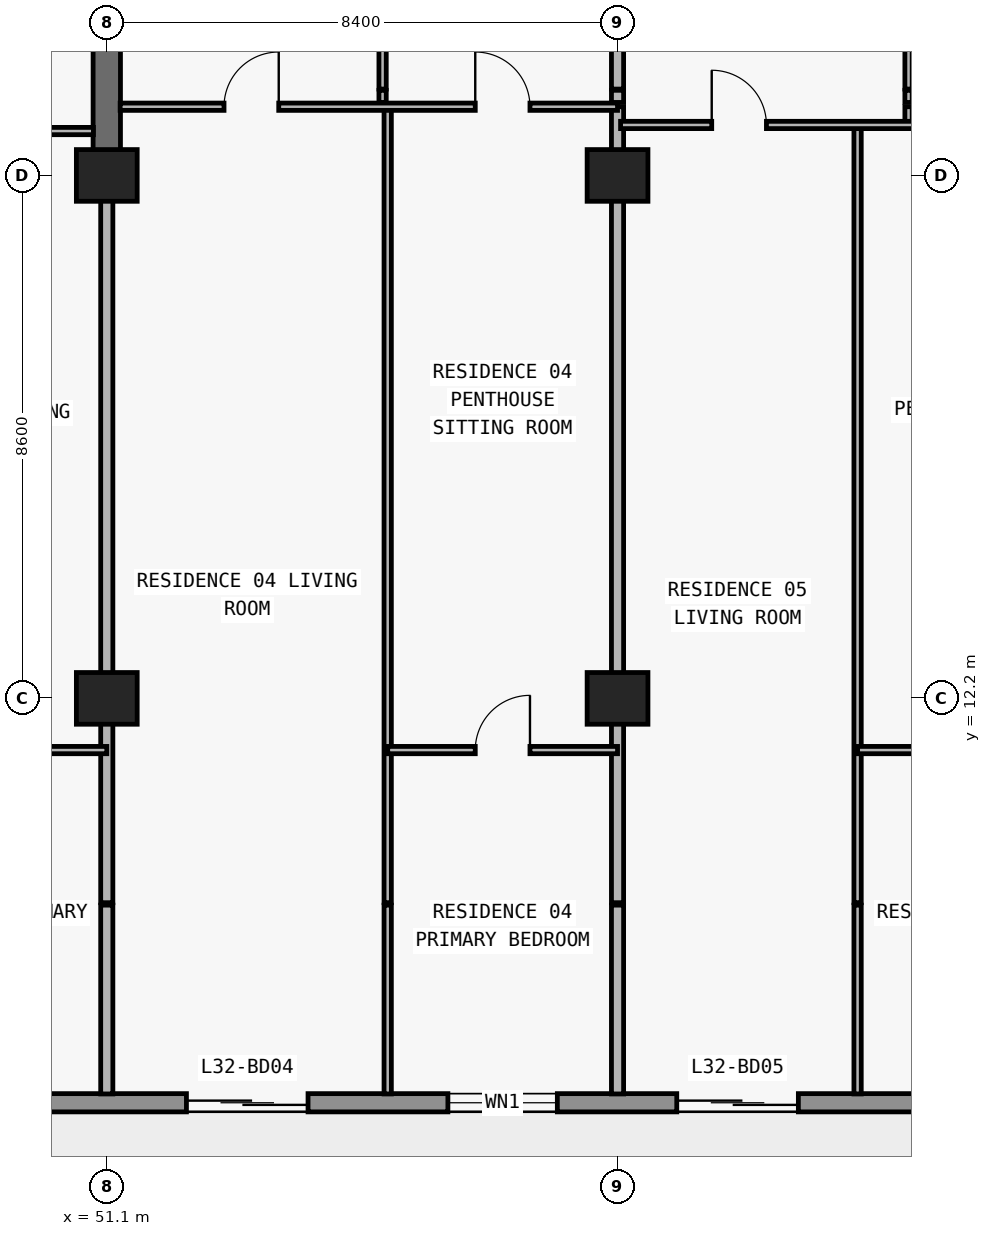
"""IFC4 building model, lengths in metres.
Left out: names, types, materials, properties, quantities, classifications, styles, units other than length and angle.
Written with IfcOpenShell. Run it as: python <this file> out.ifc"""

import sys

from ifc_helpers import new_model, si_unit, direction, frame, frame_2d, origin, origin_2d, place, context, subcontext, project, spatial, rectangle, extrude, element, fill, save


model = new_model("IFC4")
c1 = context("Model", 3, precision=1e-05, world=origin(), true_north=direction((0.0, 1.0)))
c2 = subcontext(c1, "Body", "Model", "MODEL_VIEW")
j1 = project(units=[si_unit("LENGTHUNIT", "METRE"), si_unit("PLANEANGLEUNIT", "RADIAN")], contexts=[c1])
p1 = place(None, origin())
s1 = spatial("IfcSite", under=j1, at=p1, CompositionType="ELEMENT")
p2 = place(p1, origin())
s2 = spatial("IfcBuilding", under=s1, at=p2, CompositionType="ELEMENT")
p3 = place(p2, frame((0.0, 0.0, 119.1)))
s3 = spatial("IfcBuildingStorey", under=s2, at=p3, CompositionType="ELEMENT", Elevation=119.1)
for number, where, z_axis, x_axis in (
    (1, (51.1, 12.2, 0.0), (0.0, 0.0, 1.0), (1.0, 0.0, 0.0)),
    (2, (59.5, 12.2, 0.0), (0.0, 0.0, 1.0), (1.0, 0.0, 0.0)),
    (3, (51.1, 20.8, 0.0), (0.0, 0.0, 1.0), (1.0, 0.0, 0.0)),
    (4, (59.5, 20.8, 0.0), (0.0, 0.0, 1.0), (1.0, 0.0, 0.0)),
):
    element("IfcColumn", number, at=place(p3, frame(where, z_axis=z_axis, x_axis=x_axis)), inside=s3, PredefinedType="COLUMN", context=c2, shape_type="SweptSolid", body=[
        extrude(rectangle(XDim=1.0, YDim=0.85, at=origin_2d()), origin(), (0.0, 0.0, 1.0), 3.05),
    ])
p4 = place(p3, frame((51.1, 20.8, 0.0), z_axis=(0.0, 0.0, 1.0), x_axis=(0.0, 1.0, 0.0)))
e5 = element("IfcWall", 5, at=p4, inside=s3, PredefinedType="SHEAR", context=c2, shape_type="SweptSolid", body=[
    extrude(rectangle(XDim=8.6, YDim=0.45, at=frame_2d((4.3, 0.0))), origin(), (0.0, 0.0, 1.0), 3.05),
])
p5 = place(p3, frame((70.1, 5.55, 0.0), z_axis=(0.0, 0.0, 1.0), x_axis=(-1.0, 0.0, 0.0)))
e6 = element("IfcWall", 6, at=p5, inside=s3, PredefinedType="STANDARD", context=c2, shape_type="SweptSolid", body=[
    extrude(rectangle(XDim=62.4, YDim=0.3, at=frame_2d((31.2, 0.0))), origin(), (0.0, 0.0, 1.0), 3.05),
])
p6 = place(p5, frame((57.29, 0.0, 0.0)))
e7 = element("IfcOpeningElement", 7, at=p6, cuts=e6, PredefinedType="OPENING", context=c2, shape_type="SweptSolid", body=[
    extrude(rectangle(XDim=2.0, YDim=2.3, at=frame_2d((1.0, 1.15))), frame((0.0, 0.16, 0.0), z_axis=(0.0, -1.0, 0.0), x_axis=(1.0, 0.0, 0.0)), (0.0, 0.0, 1.0), 0.32),
])
p7 = place(p5, frame((52.61, 0.0, 0.65)))
e8 = element("IfcOpeningElement", 8, at=p7, cuts=e6, PredefinedType="OPENING", context=c2, shape_type="SweptSolid", body=[
    extrude(rectangle(XDim=2.6, YDim=1.85, at=frame_2d((1.3, 0.925))), frame((0.0, 0.16, 0.0), z_axis=(0.0, -1.0, 0.0), x_axis=(1.0, 0.0, 0.0)), (0.0, 0.0, 1.0), 0.32),
])
p8 = place(p5, frame((46.5, 0.0, 0.85)))
e9 = element("IfcOpeningElement", 9, at=p8, cuts=e6, PredefinedType="OPENING", context=c2, shape_type="SweptSolid", body=[
    extrude(rectangle(XDim=2.2, YDim=1.55, at=frame_2d((1.1, 0.775))), frame((0.0, 0.16, 0.0), z_axis=(0.0, -1.0, 0.0), x_axis=(1.0, 0.0, 0.0)), (0.0, 0.0, 1.0), 0.32),
])
p9 = place(p5, frame((40.49, 0.0, 0.0)))
e10 = element("IfcOpeningElement", 10, at=p9, cuts=e6, PredefinedType="OPENING", context=c2, shape_type="SweptSolid", body=[
    extrude(rectangle(XDim=2.0, YDim=2.3, at=frame_2d((1.0, 1.15))), frame((0.0, 0.16, 0.0), z_axis=(0.0, -1.0, 0.0), x_axis=(1.0, 0.0, 0.0)), (0.0, 0.0, 1.0), 0.32),
])
p10 = place(p5, frame((35.81, 0.0, 0.65)))
e11 = element("IfcOpeningElement", 11, at=p10, cuts=e6, PredefinedType="OPENING", context=c2, shape_type="SweptSolid", body=[
    extrude(rectangle(XDim=2.6, YDim=1.85, at=frame_2d((1.3, 0.925))), frame((0.0, 0.16, 0.0), z_axis=(0.0, -1.0, 0.0), x_axis=(1.0, 0.0, 0.0)), (0.0, 0.0, 1.0), 0.32),
])
p11 = place(p5, frame((30.1, 0.0, 0.85)))
e12 = element("IfcOpeningElement", 12, at=p11, cuts=e6, PredefinedType="OPENING", context=c2, shape_type="SweptSolid", body=[
    extrude(rectangle(XDim=2.2, YDim=1.55, at=frame_2d((1.1, 0.775))), frame((0.0, 0.16, 0.0), z_axis=(0.0, -1.0, 0.0), x_axis=(1.0, 0.0, 0.0)), (0.0, 0.0, 1.0), 0.32),
])
p12 = place(p5, frame((24.426, 0.0, 0.0)))
e13 = element("IfcOpeningElement", 13, at=p12, cuts=e6, PredefinedType="OPENING", context=c2, shape_type="SweptSolid", body=[
    extrude(rectangle(XDim=2.0, YDim=2.3, at=frame_2d((1.0, 1.15))), frame((0.0, 0.16, 0.0), z_axis=(0.0, -1.0, 0.0), x_axis=(1.0, 0.0, 0.0)), (0.0, 0.0, 1.0), 0.32),
])
p13 = place(p5, frame((20.126, 0.0, 0.85)))
e14 = element("IfcOpeningElement", 14, at=p13, cuts=e6, PredefinedType="OPENING", context=c2, shape_type="SweptSolid", body=[
    extrude(rectangle(XDim=2.2, YDim=1.55, at=frame_2d((1.1, 0.775))), frame((0.0, 0.16, 0.0), z_axis=(0.0, -1.0, 0.0), x_axis=(1.0, 0.0, 0.0)), (0.0, 0.0, 1.0), 0.32),
])
p14 = place(p5, frame((15.69, 0.0, 0.0)))
e15 = element("IfcOpeningElement", 15, at=p14, cuts=e6, PredefinedType="OPENING", context=c2, shape_type="SweptSolid", body=[
    extrude(rectangle(XDim=2.0, YDim=2.3, at=frame_2d((1.0, 1.15))), frame((0.0, 0.16, 0.0), z_axis=(0.0, -1.0, 0.0), x_axis=(1.0, 0.0, 0.0)), (0.0, 0.0, 1.0), 0.32),
])
p15 = place(p5, frame((11.59, 0.0, 0.85)))
e16 = element("IfcOpeningElement", 16, at=p15, cuts=e6, PredefinedType="OPENING", context=c2, shape_type="SweptSolid", body=[
    extrude(rectangle(XDim=1.8, YDim=1.55, at=frame_2d((0.9, 0.775))), frame((0.0, 0.16, 0.0), z_axis=(0.0, -1.0, 0.0), x_axis=(1.0, 0.0, 0.0)), (0.0, 0.0, 1.0), 0.32),
])
p16 = place(p5, frame((7.626, 0.0, 0.0)))
e17 = element("IfcOpeningElement", 17, at=p16, cuts=e6, PredefinedType="OPENING", context=c2, shape_type="SweptSolid", body=[
    extrude(rectangle(XDim=2.0, YDim=2.3, at=frame_2d((1.0, 1.15))), frame((0.0, 0.16, 0.0), z_axis=(0.0, -1.0, 0.0), x_axis=(1.0, 0.0, 0.0)), (0.0, 0.0, 1.0), 0.32),
])
p17 = place(p5, frame((3.326, 0.0, 0.85)))
e18 = element("IfcOpeningElement", 18, at=p17, cuts=e6, PredefinedType="OPENING", context=c2, shape_type="SweptSolid", body=[
    extrude(rectangle(XDim=2.2, YDim=1.55, at=frame_2d((1.1, 0.775))), frame((0.0, 0.16, 0.0), z_axis=(0.0, -1.0, 0.0), x_axis=(1.0, 0.0, 0.0)), (0.0, 0.0, 1.0), 0.32),
])
p18 = place(p3, frame((51.1, 5.695, 0.0), z_axis=(0.0, 0.0, 1.0), x_axis=(0.0, 1.0, 0.0)))
e19 = element("IfcWall", 19, at=p18, inside=s3, PredefinedType="PARTITIONING", context=c2, shape_type="SweptSolid", body=[
    extrude(rectangle(XDim=3.105, YDim=0.2, at=frame_2d((1.552, 0.0))), origin(), (0.0, 0.0, 1.0), 3.05),
])
p19 = place(p3, frame((51.1, 8.84, 0.0), z_axis=(0.0, 0.0, 1.0), x_axis=(0.0, 1.0, 0.0)))
e20 = element("IfcWall", 20, at=p19, inside=s3, PredefinedType="PARTITIONING", context=c2, shape_type="SweptSolid", body=[
    extrude(rectangle(XDim=11.955, YDim=0.2, at=frame_2d((5.978, 0.0))), origin(), (0.0, 0.0, 1.0), 2.174),
])
p20 = place(p3, frame((55.636, 22.0, 0.0), z_axis=(0.0, 0.0, 1.0), x_axis=(0.0, 1.0, 0.0)))
e21 = element("IfcWall", 21, at=p20, inside=s3, PredefinedType="PARTITIONING", context=c2, shape_type="SweptSolid", body=[
    extrude(rectangle(XDim=0.2, YDim=0.12, at=frame_2d((0.1, 0.0))), origin(), (0.0, 0.0, 1.0), 3.05),
])
p21 = place(p3, frame((55.636, 22.22, 0.0), z_axis=(0.0, 0.0, 1.0), x_axis=(0.0, 1.0, 0.0)))
e22 = element("IfcWall", 22, at=p21, inside=s3, PredefinedType="PARTITIONING", context=c2, shape_type="SweptSolid", body=[
    extrude(rectangle(XDim=4.38, YDim=0.12, at=frame_2d((2.19, 0.0))), origin(), (0.0, 0.0, 1.0), 3.05),
])
p22 = place(p21, frame((1.74, 0.0, 0.0)))
e23 = element("IfcOpeningElement", 23, at=p22, cuts=e22, PredefinedType="OPENING", context=c2, shape_type="SweptSolid", body=[
    extrude(rectangle(XDim=0.9, YDim=2.15, at=frame_2d((0.45, 1.075))), frame((0.0, 0.07, 0.0), z_axis=(0.0, -1.0, 0.0), x_axis=(1.0, 0.0, 0.0)), (0.0, 0.0, 1.0), 0.14),
])
p23 = place(p3, frame((55.72, 5.695, 0.0), z_axis=(0.0, 0.0, 1.0), x_axis=(0.0, 1.0, 0.0)))
e24 = element("IfcWall", 24, at=p23, inside=s3, PredefinedType="PARTITIONING", context=c2, shape_type="SweptSolid", body=[
    extrude(rectangle(XDim=3.105, YDim=0.12, at=frame_2d((1.552, 0.0))), origin(), (0.0, 0.0, 1.0), 3.05),
])
p24 = place(p3, frame((55.72, 8.84, 0.0), z_axis=(0.0, 0.0, 1.0), x_axis=(0.0, 1.0, 0.0)))
e25 = element("IfcWall", 25, at=p24, inside=s3, PredefinedType="PARTITIONING", context=c2, shape_type="SweptSolid", body=[
    extrude(rectangle(XDim=13.09, YDim=0.12, at=frame_2d((6.545, 0.0))), origin(), (0.0, 0.0, 1.0), 3.05),
])
p25 = place(p3, frame((59.5, 5.695, 0.0), z_axis=(0.0, 0.0, 1.0), x_axis=(0.0, 1.0, 0.0)))
e26 = element("IfcWall", 26, at=p25, inside=s3, PredefinedType="PARTITIONING", context=c2, shape_type="SweptSolid", body=[
    extrude(rectangle(XDim=3.105, YDim=0.2, at=frame_2d((1.552, 0.0))), origin(), (0.0, 0.0, 1.0), 3.05),
])
p26 = place(p3, frame((59.5, 8.84, 0.0), z_axis=(0.0, 0.0, 1.0), x_axis=(0.0, 1.0, 0.0)))
e27 = element("IfcWall", 27, at=p26, inside=s3, PredefinedType="PARTITIONING", context=c2, shape_type="SweptSolid", body=[
    extrude(rectangle(XDim=13.09, YDim=0.2, at=frame_2d((6.545, 0.0))), origin(), (0.0, 0.0, 1.0), 2.174),
])
p27 = place(p3, frame((59.5, 22.0, 0.0), z_axis=(0.0, 0.0, 1.0), x_axis=(0.0, 1.0, 0.0)))
e28 = element("IfcWall", 28, at=p27, inside=s3, PredefinedType="PARTITIONING", context=c2, shape_type="SweptSolid", body=[
    extrude(rectangle(XDim=0.2, YDim=0.2, at=frame_2d((0.1, 0.0))), origin(), (0.0, 0.0, 1.0), 2.174),
])
p28 = place(p3, frame((59.5, 22.22, 0.0), z_axis=(0.0, 0.0, 1.0), x_axis=(0.0, 1.0, 0.0)))
e29 = element("IfcWall", 29, at=p28, inside=s3, PredefinedType="PARTITIONING", context=c2, shape_type="SweptSolid", body=[
    extrude(rectangle(XDim=4.38, YDim=0.2, at=frame_2d((2.19, 0.0))), origin(), (0.0, 0.0, 1.0), 2.174),
])
p29 = place(p3, frame((63.448, 5.695, 0.0), z_axis=(0.0, 0.0, 1.0), x_axis=(0.0, 1.0, 0.0)))
e30 = element("IfcWall", 30, at=p29, inside=s3, PredefinedType="PARTITIONING", context=c2, shape_type="SweptSolid", body=[
    extrude(rectangle(XDim=3.105, YDim=0.12, at=frame_2d((1.552, 0.0))), origin(), (0.0, 0.0, 1.0), 3.05),
])
p30 = place(p3, frame((63.448, 8.84, 0.0), z_axis=(0.0, 0.0, 1.0), x_axis=(0.0, 1.0, 0.0)))
e31 = element("IfcWall", 31, at=p30, inside=s3, PredefinedType="PARTITIONING", context=c2, shape_type="SweptSolid", body=[
    extrude(rectangle(XDim=12.79, YDim=0.12, at=frame_2d((6.395, 0.0))), origin(), (0.0, 0.0, 1.0), 3.05),
])
p31 = place(p3, frame((64.286, 21.63, 0.0), z_axis=(0.0, 0.0, 1.0), x_axis=(0.0, 1.0, 0.0)))
e32 = element("IfcWall", 32, at=p31, inside=s3, PredefinedType="PARTITIONING", context=c2, shape_type="SweptSolid", body=[
    extrude(rectangle(XDim=0.3, YDim=0.12, at=frame_2d((0.15, 0.0))), origin(), (0.0, 0.0, 1.0), 3.05),
])
p32 = place(p3, frame((64.286, 22.0, 0.0), z_axis=(0.0, 0.0, 1.0), x_axis=(0.0, 1.0, 0.0)))
e33 = element("IfcWall", 33, at=p32, inside=s3, PredefinedType="PARTITIONING", context=c2, shape_type="SweptSolid", body=[
    extrude(rectangle(XDim=0.2, YDim=0.12, at=frame_2d((0.1, 0.0))), origin(), (0.0, 0.0, 1.0), 3.05),
])
p33 = place(p3, frame((64.286, 22.22, 0.0), z_axis=(0.0, 0.0, 1.0), x_axis=(0.0, 1.0, 0.0)))
e34 = element("IfcWall", 34, at=p33, inside=s3, PredefinedType="PARTITIONING", context=c2, shape_type="SweptSolid", body=[
    extrude(rectangle(XDim=4.38, YDim=0.12, at=frame_2d((2.19, 0.0))), origin(), (0.0, 0.0, 1.0), 3.05),
])
p34 = place(p33, frame((1.74, 0.0, 0.0)))
e35 = element("IfcOpeningElement", 35, at=p34, cuts=e34, PredefinedType="OPENING", context=c2, shape_type="SweptSolid", body=[
    extrude(rectangle(XDim=0.9, YDim=2.15, at=frame_2d((0.45, 1.075))), frame((0.0, 0.07, 0.0), z_axis=(0.0, -1.0, 0.0), x_axis=(1.0, 0.0, 0.0)), (0.0, 0.0, 1.0), 0.14),
])
p35 = place(p3, frame((46.648, 11.35, 0.0), z_axis=(0.0, 0.0, 1.0), x_axis=(1.0, 0.0, 0.0)))
e36 = element("IfcWall", 36, at=p35, inside=s3, PredefinedType="PARTITIONING", context=c2, shape_type="SweptSolid", body=[
    extrude(rectangle(XDim=4.452, YDim=0.12, at=frame_2d((2.226, 0.0))), origin(), (0.0, 0.0, 1.0), 3.05),
])
p36 = place(p35, frame((1.776, 0.0, 0.0)))
e37 = element("IfcOpeningElement", 37, at=p36, cuts=e36, PredefinedType="OPENING", context=c2, shape_type="SweptSolid", body=[
    extrude(rectangle(XDim=0.9, YDim=2.15, at=frame_2d((0.45, 1.075))), frame((0.0, 0.07, 0.0), z_axis=(0.0, -1.0, 0.0), x_axis=(1.0, 0.0, 0.0)), (0.0, 0.0, 1.0), 0.14),
])
p37 = place(p3, frame((55.72, 11.35, 0.0), z_axis=(0.0, 0.0, 1.0), x_axis=(1.0, 0.0, 0.0)))
e38 = element("IfcWall", 38, at=p37, inside=s3, PredefinedType="PARTITIONING", context=c2, shape_type="SweptSolid", body=[
    extrude(rectangle(XDim=3.78, YDim=0.12, at=frame_2d((1.89, 0.0))), origin(), (0.0, 0.0, 1.0), 3.05),
])
p38 = place(p37, frame((1.44, 0.0, 0.0)))
e39 = element("IfcOpeningElement", 39, at=p38, cuts=e38, PredefinedType="OPENING", context=c2, shape_type="SweptSolid", body=[
    extrude(rectangle(XDim=0.9, YDim=2.15, at=frame_2d((0.45, 1.075))), frame((0.0, 0.07, 0.0), z_axis=(0.0, -1.0, 0.0), x_axis=(1.0, 0.0, 0.0)), (0.0, 0.0, 1.0), 0.14),
])
p39 = place(p3, frame((63.448, 11.35, 0.0), z_axis=(0.0, 0.0, 1.0), x_axis=(1.0, 0.0, 0.0)))
e40 = element("IfcWall", 40, at=p39, inside=s3, PredefinedType="PARTITIONING", context=c2, shape_type="SweptSolid", body=[
    extrude(rectangle(XDim=4.452, YDim=0.12, at=frame_2d((2.226, 0.0))), origin(), (0.0, 0.0, 1.0), 3.05),
])
p40 = place(p39, frame((1.776, 0.0, 0.0)))
e41 = element("IfcOpeningElement", 41, at=p40, cuts=e40, PredefinedType="OPENING", context=c2, shape_type="SweptSolid", body=[
    extrude(rectangle(XDim=0.9, YDim=2.15, at=frame_2d((0.45, 1.075))), frame((0.0, 0.07, 0.0), z_axis=(0.0, -1.0, 0.0), x_axis=(1.0, 0.0, 0.0)), (0.0, 0.0, 1.0), 0.14),
])
p41 = place(p3, frame((42.7, 21.53, 0.0), z_axis=(0.0, 0.0, 1.0), x_axis=(1.0, 0.0, 0.0)))
e42 = element("IfcWall", 42, at=p41, inside=s3, PredefinedType="PARTITIONING", context=c2, shape_type="SweptSolid", body=[
    extrude(rectangle(XDim=8.18, YDim=0.12, at=frame_2d((4.09, 0.0))), origin(), (0.0, 0.0, 1.0), 3.05),
])
p42 = place(p41, frame((1.524, 0.0, 0.0)))
e43 = element("IfcOpeningElement", 43, at=p42, cuts=e42, PredefinedType="OPENING", context=c2, shape_type="SweptSolid", body=[
    extrude(rectangle(XDim=0.9, YDim=2.15, at=frame_2d((0.45, 1.075))), frame((0.0, 0.07, 0.0), z_axis=(0.0, -1.0, 0.0), x_axis=(1.0, 0.0, 0.0)), (0.0, 0.0, 1.0), 0.14),
])
p43 = place(p41, frame((5.783, 0.0, 0.0)))
e44 = element("IfcOpeningElement", 44, at=p43, cuts=e42, PredefinedType="OPENING", context=c2, shape_type="SweptSolid", body=[
    extrude(rectangle(XDim=0.9, YDim=2.15, at=frame_2d((0.45, 1.075))), frame((0.0, 0.07, 0.0), z_axis=(0.0, -1.0, 0.0), x_axis=(1.0, 0.0, 0.0)), (0.0, 0.0, 1.0), 0.14),
])
p44 = place(p3, frame((59.55, 21.63, 0.0), z_axis=(0.0, 0.0, 1.0), x_axis=(1.0, 0.0, 0.0)))
e45 = element("IfcWall", 45, at=p44, inside=s3, PredefinedType="PARTITIONING", context=c2, shape_type="SweptSolid", body=[
    extrude(rectangle(XDim=8.35, YDim=0.12, at=frame_2d((4.175, 0.0))), origin(), (0.0, 0.0, 1.0), 3.05),
])
p45 = place(p44, frame((1.499, 0.0, 0.0)))
e46 = element("IfcOpeningElement", 46, at=p45, cuts=e45, PredefinedType="OPENING", context=c2, shape_type="SweptSolid", body=[
    extrude(rectangle(XDim=0.9, YDim=2.15, at=frame_2d((0.45, 1.075))), frame((0.0, 0.07, 0.0), z_axis=(0.0, -1.0, 0.0), x_axis=(1.0, 0.0, 0.0)), (0.0, 0.0, 1.0), 0.14),
])
p46 = place(p44, frame((6.093, 0.0, 0.0)))
e47 = element("IfcOpeningElement", 47, at=p46, cuts=e45, PredefinedType="OPENING", context=c2, shape_type="SweptSolid", body=[
    extrude(rectangle(XDim=0.9, YDim=2.15, at=frame_2d((0.45, 1.075))), frame((0.0, 0.07, 0.0), z_axis=(0.0, -1.0, 0.0), x_axis=(1.0, 0.0, 0.0)), (0.0, 0.0, 1.0), 0.14),
])
p47 = place(p3, frame((51.32, 21.93, 0.0), z_axis=(0.0, 0.0, 1.0), x_axis=(1.0, 0.0, 0.0)))
e48 = element("IfcWall", 48, at=p47, inside=s3, PredefinedType="PARTITIONING", context=c2, shape_type="SweptSolid", body=[
    extrude(rectangle(XDim=8.18, YDim=0.12, at=frame_2d((4.09, 0.0))), origin(), (0.0, 0.0, 1.0), 3.05),
])
p48 = place(p47, frame((1.708, 0.0, 0.0)))
e49 = element("IfcOpeningElement", 49, at=p48, cuts=e48, PredefinedType="OPENING", context=c2, shape_type="SweptSolid", body=[
    extrude(rectangle(XDim=0.9, YDim=2.15, at=frame_2d((0.45, 1.075))), frame((0.0, 0.07, 0.0), z_axis=(0.0, -1.0, 0.0), x_axis=(1.0, 0.0, 0.0)), (0.0, 0.0, 1.0), 0.14),
])
p49 = place(p47, frame((5.84, 0.0, 0.0)))
e50 = element("IfcOpeningElement", 50, at=p49, cuts=e48, PredefinedType="OPENING", context=c2, shape_type="SweptSolid", body=[
    extrude(rectangle(XDim=0.9, YDim=2.15, at=frame_2d((0.45, 1.075))), frame((0.0, 0.07, 0.0), z_axis=(0.0, -1.0, 0.0), x_axis=(1.0, 0.0, 0.0)), (0.0, 0.0, 1.0), 0.14),
])
p50 = place(p14, origin())
e51 = element("IfcDoor", 51, at=p50, inside=s3, OperationType="DOUBLE_DOOR_SLIDING", PredefinedType="DOOR", context=c2, shape_type="SweptSolid", body=[
    extrude(rectangle(XDim=2.0, YDim=2.3, at=frame_2d((1.0, 1.15))), frame((0.0, 0.025, 0.0), z_axis=(0.0, -1.0, 0.0), x_axis=(1.0, 0.0, 0.0)), (0.0, 0.0, 1.0), 0.05),
])
fill(e15, e51)
p51 = place(p15, origin())
e52 = element("IfcWindow", 52, at=p51, inside=s3, PartitioningType="SINGLE_PANEL", PredefinedType="WINDOW", context=c2, shape_type="SweptSolid", body=[
    extrude(rectangle(XDim=1.8, YDim=1.55, at=frame_2d((0.9, 0.775))), frame((0.0, 0.03, 0.0), z_axis=(0.0, -1.0, 0.0), x_axis=(1.0, 0.0, 0.0)), (0.0, 0.0, 1.0), 0.06),
])
fill(e16, e52)
p52 = place(p16, origin())
e53 = element("IfcDoor", 53, at=p52, inside=s3, OperationType="DOUBLE_DOOR_SLIDING", PredefinedType="DOOR", context=c2, shape_type="SweptSolid", body=[
    extrude(rectangle(XDim=2.0, YDim=2.3, at=frame_2d((1.0, 1.15))), frame((0.0, 0.025, 0.0), z_axis=(0.0, -1.0, 0.0), x_axis=(1.0, 0.0, 0.0)), (0.0, 0.0, 1.0), 0.05),
])
fill(e17, e53)
p53 = place(p48, origin())
e54 = element("IfcDoor", 54, at=p53, inside=s3, OperationType="SINGLE_SWING_RIGHT", PredefinedType="DOOR", context=c2, shape_type="SweptSolid", body=[
    extrude(rectangle(XDim=0.9, YDim=2.15, at=frame_2d((0.45, 1.075))), frame((0.0, 0.025, 0.0), z_axis=(0.0, -1.0, 0.0), x_axis=(1.0, 0.0, 0.0)), (0.0, 0.0, 1.0), 0.05),
])
fill(e49, e54)
p54 = place(p49, origin())
e55 = element("IfcDoor", 55, at=p54, inside=s3, OperationType="SINGLE_SWING_LEFT", PredefinedType="DOOR", context=c2, shape_type="SweptSolid", body=[
    extrude(rectangle(XDim=0.9, YDim=2.15, at=frame_2d((0.45, 1.075))), frame((0.0, 0.025, 0.0), z_axis=(0.0, -1.0, 0.0), x_axis=(1.0, 0.0, 0.0)), (0.0, 0.0, 1.0), 0.05),
])
fill(e50, e55)
p55 = place(p38, origin())
e56 = element("IfcDoor", 56, at=p55, inside=s3, OperationType="SINGLE_SWING_RIGHT", PredefinedType="DOOR", context=c2, shape_type="SweptSolid", body=[
    extrude(rectangle(XDim=0.9, YDim=2.15, at=frame_2d((0.45, 1.075))), frame((0.0, 0.025, 0.0), z_axis=(0.0, -1.0, 0.0), x_axis=(1.0, 0.0, 0.0)), (0.0, 0.0, 1.0), 0.05),
])
fill(e39, e56)
p56 = place(p45, origin())
e57 = element("IfcDoor", 57, at=p56, inside=s3, OperationType="SINGLE_SWING_LEFT", PredefinedType="DOOR", context=c2, shape_type="SweptSolid", body=[
    extrude(rectangle(XDim=0.9, YDim=2.15, at=frame_2d((0.45, 1.075))), frame((0.0, 0.025, 0.0), z_axis=(0.0, -1.0, 0.0), x_axis=(1.0, 0.0, 0.0)), (0.0, 0.0, 1.0), 0.05),
])
fill(e46, e57)
save(model, sys.argv[1])
